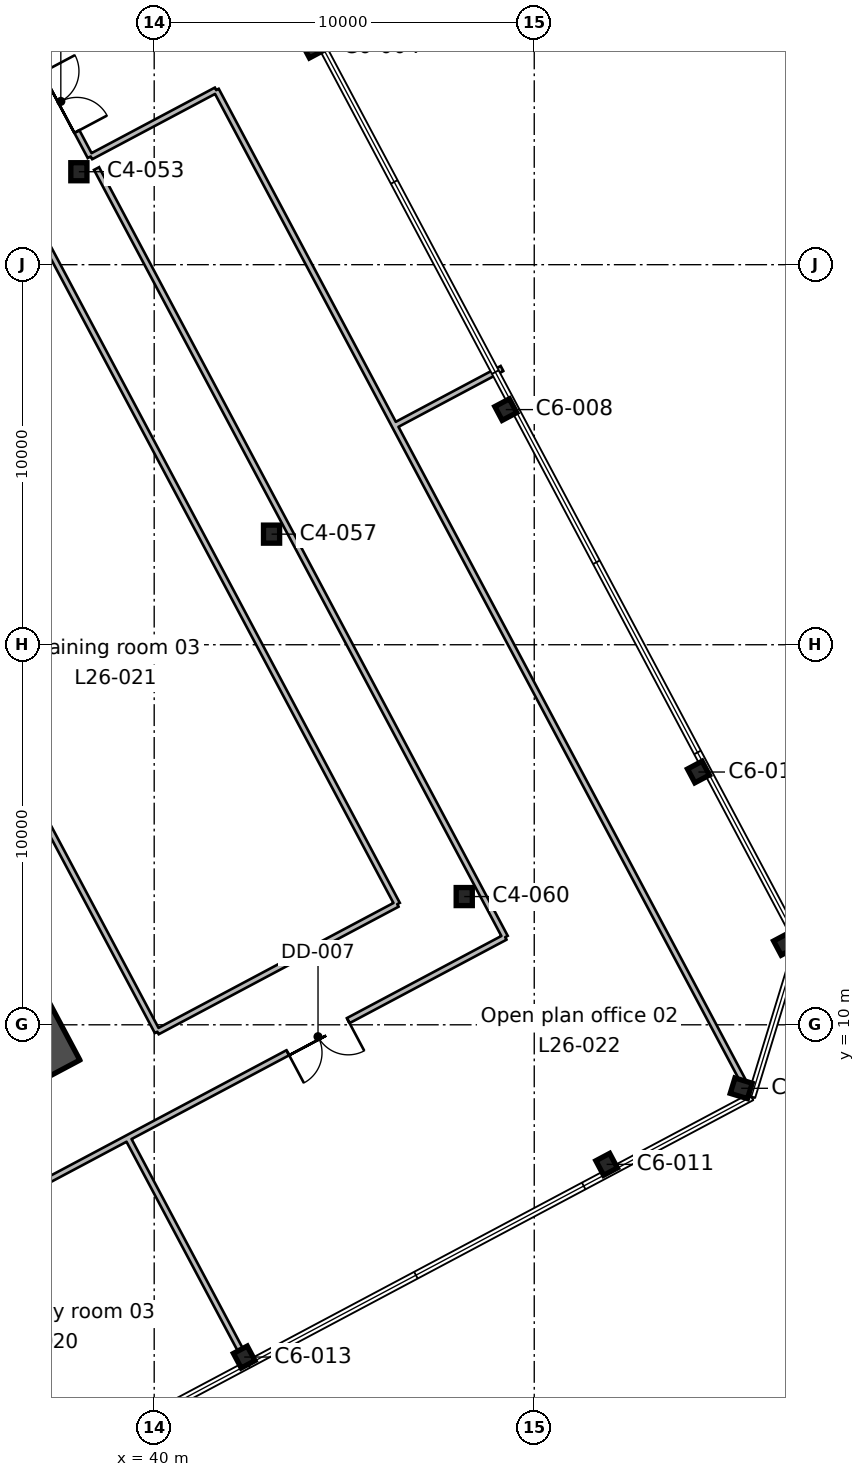
"""IFC4 building model, lengths in metres.
Left out: names, types, materials, properties, quantities, classifications, styles, units other than length and angle.
Written with IfcOpenShell. Run it as: python <this file> out.ifc"""

import sys

from ifc_helpers import new_model, si_unit, direction, frame, frame_2d, origin, origin_2d, place, context, subcontext, project, spatial, rectangle, i_section, extrude, element, fill, save


model = new_model("IFC4")
c1 = context("Model", 3, precision=1e-05, world=origin(), true_north=direction((0.0, 1.0)))
c2 = subcontext(c1, "Body", "Model", "MODEL_VIEW")
j1 = project(units=[si_unit("LENGTHUNIT", "METRE"), si_unit("PLANEANGLEUNIT", "RADIAN")], contexts=[c1])
p1 = place(None, origin())
s1 = spatial("IfcSite", under=j1, at=p1, CompositionType="ELEMENT")
p2 = place(p1, origin())
s2 = spatial("IfcBuilding", under=s1, at=p2, CompositionType="ELEMENT")
p3 = place(p2, frame((0.0, 0.0, 130.2)))
s3 = spatial("IfcBuildingStorey", under=s2, at=p3, CompositionType="ELEMENT", Elevation=130.2)
for number, where, z_axis, x_axis in (
    (1, (42.369, 1.258, 0.0), (0.0, 0.0, 1.0), (0.883, 0.469, 0.0)),
    (2, (51.905, 6.328, 0.0), (0.0, 0.0, 1.0), (0.883, 0.469, 0.0)),
):
    element("IfcColumn", number, at=place(p3, frame(where, z_axis=z_axis, x_axis=x_axis)), inside=s3, PredefinedType="COLUMN", context=c2, shape_type="SweptSolid", body=[
        extrude(i_section(OverallWidth=0.412, OverallDepth=0.434, WebThickness=0.036, FlangeThickness=0.057, FilletRadius=0.015, at=origin_2d()), origin(), (0.0, 0.0, 1.0), 4.0),
    ])
for number, where, z_axis, x_axis in (
    (3, (55.446, 8.329, 0.0), (0.0, 0.0, 1.0), (0.292, 0.956, 0.0)),
    (4, (56.608, 12.13, 0.0), (0.0, 0.0, 1.0), (-0.469, 0.883, 0.0)),
    (5, (48.158, 13.374, 0.0), (0.0, 0.0, 1.0), (1.0, 0.0, 0.0)),
):
    element("IfcColumn", number, at=place(p3, frame(where, z_axis=z_axis, x_axis=x_axis)), inside=s3, PredefinedType="COLUMN", context=c2, shape_type="SweptSolid", body=[
        extrude(i_section(OverallWidth=0.424, OverallDepth=0.475, WebThickness=0.048, FlangeThickness=0.077, FilletRadius=0.015, at=origin_2d()), origin(), (0.0, 0.0, 1.0), 4.0),
    ])
p4 = place(p3, frame((54.321, 16.651, 0.0), z_axis=(0.0, 0.0, 1.0), x_axis=(-0.469471562786, 0.882947592859, 0.0)))
e6 = element("IfcColumn", 6, at=p4, inside=s3, PredefinedType="COLUMN", context=c2, shape_type="SweptSolid", body=[
    extrude(i_section(OverallWidth=0.412, OverallDepth=0.434, WebThickness=0.036, FlangeThickness=0.057, FilletRadius=0.015, at=origin_2d()), origin(), (0.0, 0.0, 1.0), 4.0),
])
p5 = place(p3, frame((43.088, 22.91, 0.0), z_axis=(0.0, 0.0, 1.0), x_axis=(1.0, 0.0, 0.0)))
e7 = element("IfcColumn", 7, at=p5, inside=s3, PredefinedType="COLUMN", context=c2, shape_type="SweptSolid", body=[
    extrude(i_section(OverallWidth=0.424, OverallDepth=0.475, WebThickness=0.048, FlangeThickness=0.077, FilletRadius=0.015, at=origin_2d()), origin(), (0.0, 0.0, 1.0), 4.0),
])
p6 = place(p3, frame((49.251, 26.187, 0.0), z_axis=(0.0, 0.0, 1.0), x_axis=(-0.469471562786, 0.882947592859, 0.0)))
e8 = element("IfcColumn", 8, at=p6, inside=s3, PredefinedType="COLUMN", context=c2, shape_type="SweptSolid", body=[
    extrude(i_section(OverallWidth=0.412, OverallDepth=0.434, WebThickness=0.036, FlangeThickness=0.057, FilletRadius=0.015, at=origin_2d()), origin(), (0.0, 0.0, 1.0), 4.0),
])
p7 = place(p3, frame((38.018, 32.446, 0.0), z_axis=(0.0, 0.0, 1.0), x_axis=(1.0, 0.0, 0.0)))
e9 = element("IfcColumn", 9, at=p7, inside=s3, PredefinedType="COLUMN", context=c2, shape_type="SweptSolid", body=[
    extrude(i_section(OverallWidth=0.424, OverallDepth=0.475, WebThickness=0.048, FlangeThickness=0.077, FilletRadius=0.015, at=origin_2d()), origin(), (0.0, 0.0, 1.0), 4.0),
])
p8 = place(p3, frame((44.181, 35.723, 0.0), z_axis=(0.0, 0.0, 1.0), x_axis=(-0.469471562786, 0.882947592859, 0.0)))
e10 = element("IfcColumn", 10, at=p8, inside=s3, PredefinedType="COLUMN", context=c2, shape_type="SweptSolid", body=[
    extrude(i_section(OverallWidth=0.412, OverallDepth=0.434, WebThickness=0.036, FlangeThickness=0.057, FilletRadius=0.015, at=origin_2d()), origin(), (0.0, 0.0, 1.0), 4.0),
])
p9 = place(p3, frame((37.713, 8.896, 0.0), z_axis=(0.0, 0.0, 1.0), x_axis=(-0.469469918705, 0.88294846703, 0.0)))
e11 = element("IfcWall", 11, at=p9, inside=s3, PredefinedType="SHEAR", context=c2, shape_type="SweptSolid", body=[
    extrude(rectangle(XDim=19.7, YDim=0.75, at=frame_2d((9.85, 0.0))), origin(), (0.0, 0.0, 1.0), 4.0),
])
p10 = place(p9, frame((10.45, 0.0, 0.0)))
e12 = element("IfcOpeningElement", 12, at=p10, cuts=e11, PredefinedType="OPENING", context=c2, shape_type="SweptSolid", body=[
    extrude(rectangle(XDim=2.4, YDim=2.4, at=frame_2d((1.2, 1.2))), frame((0.0, 0.385, 0.0), z_axis=(0.0, -1.0, 0.0), x_axis=(1.0, 0.0, 0.0)), (0.0, 0.0, 1.0), 0.77),
])
p11 = place(p3, frame((19.37, -0.432, 0.0), z_axis=(0.0, 0.0, 1.0), x_axis=(0.88294509198, 0.469476266226, 0.0)))
e13 = element("IfcWall", 13, at=p11, inside=s3, PredefinedType="SHEAR", context=c2, shape_type="SweptSolid", body=[
    extrude(rectangle(XDim=20.2, YDim=0.75, at=frame_2d((10.1, 0.0))), origin(), (0.0, 0.0, 1.0), 4.0),
])
p12 = place(p3, frame((38.318, 32.84, 0.0), z_axis=(0.0, 0.0, 1.0), x_axis=(-0.469716602495, 0.882817259313, 0.0)))
e14 = element("IfcWall", 14, at=p12, inside=s3, PredefinedType="PARTITIONING", context=c2, shape_type="SweptSolid", body=[
    extrude(rectangle(XDim=3.243, YDim=0.15, at=frame_2d((1.621, 0.0))), origin(), (0.0, 0.0, 1.0), 3.64),
])
p13 = place(p12, frame((0.75, 0.0, 0.0)))
e15 = element("IfcOpeningElement", 15, at=p13, cuts=e14, PredefinedType="OPENING", context=c2, shape_type="SweptSolid", body=[
    extrude(rectangle(XDim=1.8, YDim=2.1, at=frame_2d((0.9, 1.05))), frame((0.0, 0.085, 0.0), z_axis=(0.0, -1.0, 0.0), x_axis=(1.0, 0.0, 0.0)), (0.0, 0.0, 1.0), 0.17),
])
p14 = place(p3, frame((39.321, 7.034, 0.0), z_axis=(0.0, 0.0, 1.0), x_axis=(-0.88292452231, -0.469514949605, 0.0)))
e16 = element("IfcWall", 16, at=p14, inside=s3, PredefinedType="PARTITIONING", context=c2, shape_type="SweptSolid", body=[
    extrude(rectangle(XDim=16.771, YDim=0.15, at=frame_2d((8.385, 0.0))), origin(), (0.0, 0.0, 1.0), 3.64),
])
p15 = place(p14, frame((7.849, 0.0, 0.0)))
e17 = element("IfcOpeningElement", 17, at=p15, cuts=e16, PredefinedType="OPENING", context=c2, shape_type="SweptSolid", body=[
    extrude(rectangle(XDim=1.0, YDim=2.1, at=frame_2d((0.5, 1.05))), frame((0.0, 0.085, 0.0), z_axis=(0.0, -1.0, 0.0), x_axis=(1.0, 0.0, 0.0)), (0.0, 0.0, 1.0), 0.17),
])
p16 = place(p3, frame((35.927, 32.863, 0.0), z_axis=(0.0, 0.0, 1.0), x_axis=(0.469478059645, -0.882944138387, 0.0)))
e18 = element("IfcWall", 18, at=p16, inside=s3, PredefinedType="PARTITIONING", context=c2, shape_type="SweptSolid", body=[
    extrude(rectangle(XDim=22.299, YDim=0.15, at=frame_2d((11.15, 0.0))), origin(), (0.0, 0.0, 1.0), 3.64),
])
p17 = place(p3, frame((46.396, 13.174, 0.0), z_axis=(0.0, 0.0, 1.0), x_axis=(-0.882918469701, -0.469526331381, 0.0)))
e19 = element("IfcWall", 19, at=p17, inside=s3, PredefinedType="PARTITIONING", context=c2, shape_type="SweptSolid", body=[
    extrude(rectangle(XDim=7.15, YDim=0.15, at=frame_2d((3.575, 0.0))), origin(), (0.0, 0.0, 1.0), 3.64),
])
p18 = place(p3, frame((40.083, 9.817, 0.0), z_axis=(0.0, 0.0, 1.0), x_axis=(-0.469455368788, 0.88295620317, 0.0)))
e20 = element("IfcWall", 20, at=p18, inside=s3, PredefinedType="PARTITIONING", context=c2, shape_type="SweptSolid", body=[
    extrude(rectangle(XDim=22.3, YDim=0.15, at=frame_2d((11.15, 0.0))), origin(), (0.0, 0.0, 1.0), 3.64),
])
p19 = place(p3, frame((39.303, 7.024, 0.0), z_axis=(0.0, 0.0, 1.0), x_axis=(0.469333338233, -0.88302107428, 0.0)))
e21 = element("IfcWall", 21, at=p19, inside=s3, PredefinedType="PARTITIONING", context=c2, shape_type="SweptSolid", body=[
    extrude(rectangle(XDim=6.313, YDim=0.15, at=frame_2d((3.157, 0.0))), origin(), (0.0, 0.0, 1.0), 3.64),
])
p20 = place(p3, frame((46.081, 26.226, 0.0), z_axis=(0.0, 0.0, 1.0), x_axis=(-0.469444635522, 0.882961909812, 0.0)))
e22 = element("IfcWall", 22, at=p20, inside=s3, PredefinedType="PARTITIONING", context=c2, shape_type="SweptSolid", body=[
    extrude(rectangle(XDim=9.477, YDim=0.15, at=frame_2d((4.739, 0.0))), origin(), (0.0, 0.0, 1.0), 3.64),
])
p21 = place(p3, frame((41.632, 34.594, 0.0), z_axis=(0.0, 0.0, 1.0), x_axis=(-0.883031968756, -0.46931284039, 0.0)))
e23 = element("IfcWall", 23, at=p21, inside=s3, PredefinedType="PARTITIONING", context=c2, shape_type="SweptSolid", body=[
    extrude(rectangle(XDim=3.737, YDim=0.15, at=frame_2d((1.869, 0.0))), origin(), (0.0, 0.0, 1.0), 3.64),
])
p22 = place(p3, frame((39.321, 7.034, 0.0), z_axis=(0.0, 0.0, 1.0), x_axis=(0.882945641188, 0.469475233326, 0.0)))
e24 = element("IfcWall", 24, at=p22, inside=s3, PredefinedType="PARTITIONING", context=c2, shape_type="SweptSolid", body=[
    extrude(rectangle(XDim=11.229, YDim=0.15, at=frame_2d((5.615, 0.0))), origin(), (0.0, 0.0, 1.0), 3.64),
])
p23 = place(p22, frame((4.751, 0.0, 0.0)))
e25 = element("IfcOpeningElement", 25, at=p23, cuts=e24, PredefinedType="OPENING", context=c2, shape_type="SweptSolid", body=[
    extrude(rectangle(XDim=1.8, YDim=2.1, at=frame_2d((0.9, 1.05))), frame((0.0, 0.085, 0.0), z_axis=(0.0, -1.0, 0.0), x_axis=(1.0, 0.0, 0.0)), (0.0, 0.0, 1.0), 0.17),
])
p24 = place(p3, frame((38.483, 32.529, 0.0), z_axis=(0.0, 0.0, 1.0), x_axis=(0.469465364691, -0.882950888416, 0.0)))
e26 = element("IfcWall", 26, at=p24, inside=s3, PredefinedType="PARTITIONING", context=c2, shape_type="SweptSolid", body=[
    extrude(rectangle(XDim=22.905, YDim=0.15, at=frame_2d((11.453, 0.0))), origin(), (0.0, 0.0, 1.0), 3.64),
])
p25 = place(p3, frame((46.081, 26.226, 0.0), z_axis=(0.0, 0.0, 1.0), x_axis=(0.469497962096, -0.88293355559, 0.0)))
e27 = element("IfcWall", 27, at=p25, inside=s3, PredefinedType="PARTITIONING", context=c2, shape_type="SweptSolid", body=[
    extrude(rectangle(XDim=20.032, YDim=0.15, at=frame_2d((10.016, 0.0))), origin(), (0.0, 0.0, 1.0), 3.64),
])
p26 = place(p3, frame((49.152, 27.268, 0.0), z_axis=(0.0, 0.0, 1.0), x_axis=(-0.882819217955, -0.469712921271, 0.0)))
e28 = element("IfcWall", 28, at=p26, inside=s3, PredefinedType="PARTITIONING", context=c2, shape_type="SweptSolid", body=[
    extrude(rectangle(XDim=3.2, YDim=0.15, at=frame_2d((1.6, 0.0))), origin(), (0.0, 0.0, 1.0), 3.64),
])
p27 = place(p23, frame((1.8, 0.0, 0.0), z_axis=(0.0, 0.0, 1.0), x_axis=(-1.0, 0.0, 0.0)))
e29 = element("IfcDoor", 29, at=p27, inside=s3, OperationType="DOUBLE_DOOR_SINGLE_SWING", PredefinedType="DOOR", context=c2, shape_type="SweptSolid", body=[
    extrude(rectangle(XDim=1.8, YDim=2.1, at=frame_2d((0.9, 1.05))), frame((0.0, 0.025, 0.0), z_axis=(0.0, -1.0, 0.0), x_axis=(1.0, 0.0, 0.0)), (0.0, 0.0, 1.0), 0.05),
])
fill(e25, e29)
p28 = place(p13, frame((1.8, 0.0, 0.0), z_axis=(0.0, 0.0, 1.0), x_axis=(-1.0, 0.0, 0.0)))
e30 = element("IfcDoor", 30, at=p28, inside=s3, OperationType="DOUBLE_DOOR_SINGLE_SWING", PredefinedType="DOOR", context=c2, shape_type="SweptSolid", body=[
    extrude(rectangle(XDim=1.8, YDim=2.1, at=frame_2d((0.9, 1.05))), frame((0.0, 0.025, 0.0), z_axis=(0.0, -1.0, 0.0), x_axis=(1.0, 0.0, 0.0)), (0.0, 0.0, 1.0), 0.05),
])
fill(e15, e30)
save(model, sys.argv[1])
